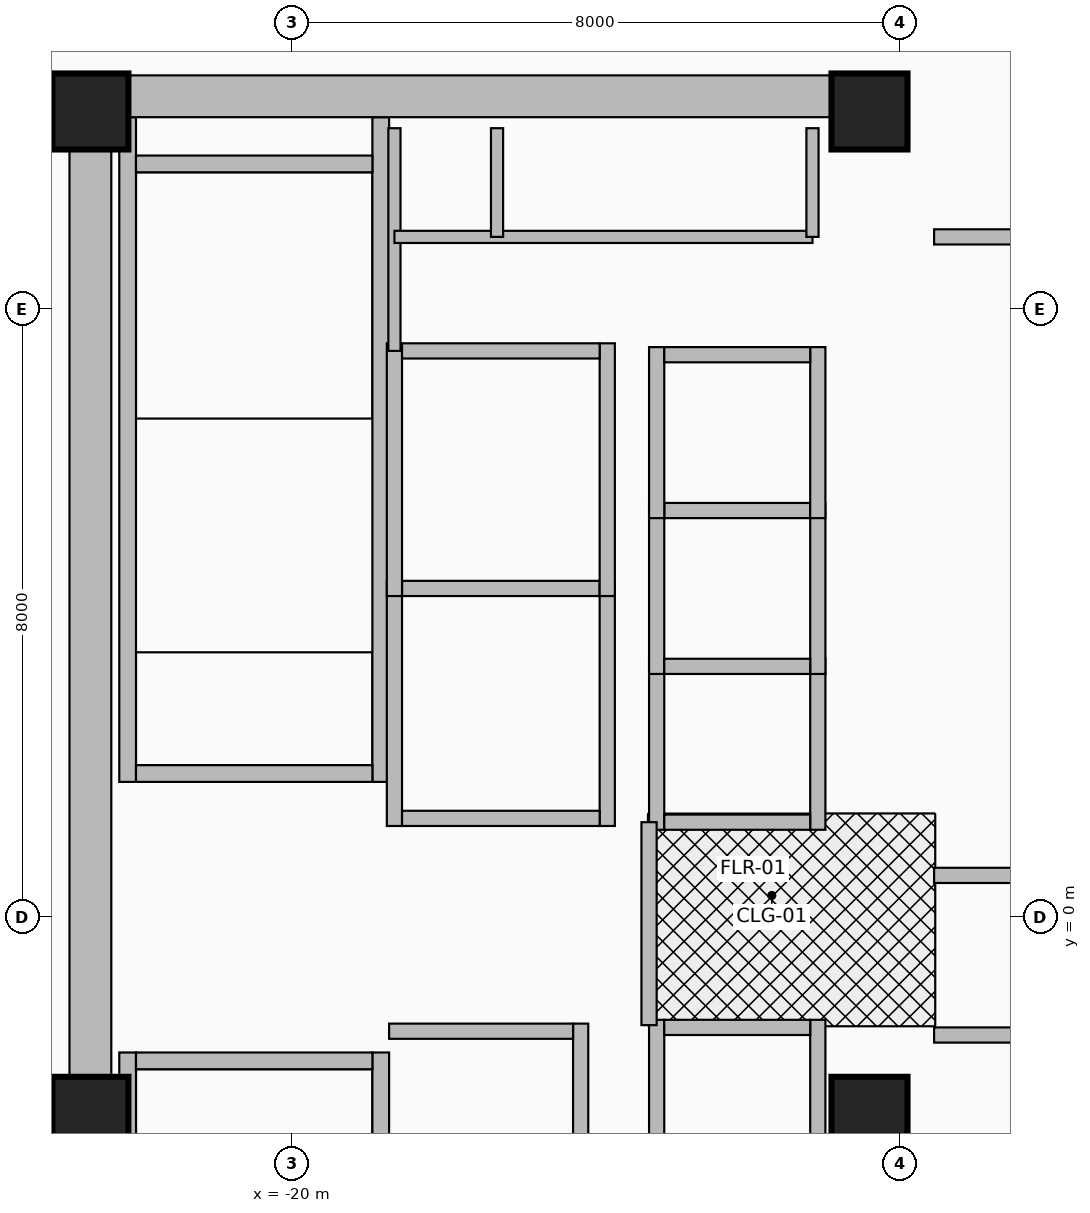
"""IFC4 building model, lengths in metres.
Left out: names, types, materials, properties, quantities, classifications, styles, units other than length and angle.
Written with IfcOpenShell. Run it as: python <this file> out.ifc"""

import sys

from ifc_helpers import new_model, si_unit, direction, frame, frame_2d, origin, origin_2d, place, context, subcontext, project, spatial, rectangle, extrude, source, transform, mapped, element, fill, save


model = new_model("IFC4")
c1 = context("Model", 3, precision=1e-05, world=origin(), true_north=direction((0.0, 1.0)))
c2 = subcontext(c1, "Body", "Model", "MODEL_VIEW")
j1 = project(units=[si_unit("LENGTHUNIT", "METRE"), si_unit("PLANEANGLEUNIT", "RADIAN")], contexts=[c1])
p1 = place(None, origin())
s1 = spatial("IfcSite", under=j1, at=p1, CompositionType="ELEMENT")
p2 = place(p1, origin())
s2 = spatial("IfcBuilding", under=s1, at=p2, CompositionType="ELEMENT")
p3 = place(p2, frame((0.0, 0.0, 172.3)))
s3 = spatial("IfcBuildingStorey", under=s2, at=p3, CompositionType="ELEMENT", Elevation=172.3)
for number, where, z_axis, x_axis in (
    (1, (-22.16, 1.78, 0.0), (0.0, 0.0, 1.0), (0.0, 1.0, 0.0)),
    (2, (-18.83, 1.78, 0.0), (0.0, 0.0, 1.0), (0.0, 1.0, 0.0)),
):
    element("IfcWall", number, at=place(p3, frame(where, z_axis=z_axis, x_axis=x_axis)), inside=s3, PredefinedType="SHEAR", context=c2, shape_type="SweptSolid", body=[
        extrude(rectangle(XDim=8.745, YDim=0.22, at=frame_2d((4.373, 0.0))), origin(), (0.0, 0.0, 1.0), 3.93),
    ])
p4 = place(p3, frame((-22.05, 1.89, 0.0), z_axis=(0.0, 0.0, 1.0), x_axis=(1.0, 0.0, 0.0)))
e3 = element("IfcWall", 3, at=p4, inside=s3, PredefinedType="SHEAR", context=c2, shape_type="SweptSolid", body=[
    extrude(rectangle(XDim=3.11, YDim=0.22, at=frame_2d((1.555, 0.0))), origin(), (0.0, 0.0, 1.0), 3.93),
])
p5 = place(p4, frame((1.0, 0.0, 0.0)))
e4 = element("IfcOpeningElement", 4, at=p5, cuts=e3, PredefinedType="OPENING", context=c2, shape_type="SweptSolid", body=[
    extrude(rectangle(XDim=1.1, YDim=2.15, at=frame_2d((0.55, 1.075))), frame((0.0, 0.125, 0.0), z_axis=(0.0, -1.0, 0.0), x_axis=(1.0, 0.0, 0.0)), (0.0, 0.0, 1.0), 0.25),
])
p6 = place(p3, frame((-22.05, 9.91, 0.0), z_axis=(0.0, 0.0, 1.0), x_axis=(1.0, 0.0, 0.0)))
e5 = element("IfcWall", 5, at=p6, inside=s3, PredefinedType="SHEAR", context=c2, shape_type="SweptSolid", body=[
    extrude(rectangle(XDim=3.11, YDim=0.22, at=frame_2d((1.555, 0.0))), origin(), (0.0, 0.0, 1.0), 3.93),
])
for number, where, z_axis, x_axis in (
    (6, (-22.16, -10.525, 0.0), (0.0, 0.0, 1.0), (0.0, 1.0, 0.0)),
    (7, (-18.83, -10.525, 0.0), (0.0, 0.0, 1.0), (0.0, 1.0, 0.0)),
):
    element("IfcWall", number, at=place(p3, frame(where, z_axis=z_axis, x_axis=x_axis)), inside=s3, PredefinedType="SHEAR", context=c2, shape_type="SweptSolid", body=[
        extrude(rectangle(XDim=8.745, YDim=0.22, at=frame_2d((4.373, 0.0))), origin(), (0.0, 0.0, 1.0), 3.93),
    ])
p7 = place(p3, frame((-22.05, -1.89, 0.0), z_axis=(0.0, 0.0, 1.0), x_axis=(1.0, 0.0, 0.0)))
e8 = element("IfcWall", 8, at=p7, inside=s3, PredefinedType="SHEAR", context=c2, shape_type="SweptSolid", body=[
    extrude(rectangle(XDim=3.11, YDim=0.22, at=frame_2d((1.555, 0.0))), origin(), (0.0, 0.0, 1.0), 3.93),
])
p8 = place(p7, frame((1.0, 0.0, 0.0)))
e9 = element("IfcOpeningElement", 9, at=p8, cuts=e8, PredefinedType="OPENING", context=c2, shape_type="SweptSolid", body=[
    extrude(rectangle(XDim=1.1, YDim=2.15, at=frame_2d((0.55, 1.075))), frame((0.0, 0.125, 0.0), z_axis=(0.0, -1.0, 0.0), x_axis=(1.0, 0.0, 0.0)), (0.0, 0.0, 1.0), 0.25),
])
p9 = place(p3, frame((-22.65, -11.075, 0.0), z_axis=(0.0, 0.0, 1.0), x_axis=(0.0, 1.0, 0.0)))
e10 = element("IfcWall", 10, at=p9, inside=s3, PredefinedType="SHEAR", context=c2, shape_type="SweptSolid", body=[
    extrude(rectangle(XDim=22.15, YDim=0.55, at=frame_2d((11.075, 0.0))), origin(), (0.0, 0.0, 1.0), 3.93),
])
p10 = place(p3, frame((-22.65, 10.8, 0.0), z_axis=(0.0, 0.0, 1.0), x_axis=(1.0, 0.0, 0.0)))
e11 = element("IfcWall", 11, at=p10, inside=s3, PredefinedType="SHEAR", context=c2, shape_type="SweptSolid", body=[
    extrude(rectangle(XDim=10.25, YDim=0.55, at=frame_2d((5.125, 0.0))), origin(), (0.0, 0.0, 1.0), 3.93),
])
m1 = source(origin(), c2, "Body", "SweptSolid", [
    extrude(rectangle(XDim=1.0, YDim=1.0, at=origin_2d()), origin(), (0.0, 0.0, 1.0), 4.25),
])
for number, where, z_axis, x_axis in (
    (12, (-22.65, -2.6, 0.0), (0.0, 0.0, 1.0), (1.0, 0.0, 0.0)),
    (13, (-12.4, -2.6, 0.0), (0.0, 0.0, 1.0), (1.0, 0.0, 0.0)),
    (14, (-22.65, 10.6, 0.0), (0.0, 0.0, 1.0), (1.0, 0.0, 0.0)),
    (15, (-12.4, 10.6, 0.0), (0.0, 0.0, 1.0), (1.0, 0.0, 0.0)),
):
    element("IfcColumn", number, at=place(p3, frame(where, z_axis=z_axis, x_axis=x_axis)), inside=s3, PredefinedType="COLUMN", context=c2, shape_type="MappedRepresentation", body=[
        mapped(m1, transform((0.0, 0.0, 0.0), x_axis=(1.0, 0.0, 0.0), y_axis=(0.0, 1.0, 0.0), z_axis=(0.0, 0.0, 1.0), scale=1.0)),
    ])
for number, where, z_axis, x_axis in (
    (16, (-18.65, 1.2, 0.0), (0.0, 0.0, 1.0), (0.0, 1.0, 0.0)),
    (17, (-15.85, 1.2, 0.0), (0.0, 0.0, 1.0), (0.0, 1.0, 0.0)),
):
    element("IfcWall", number, at=place(p3, frame(where, z_axis=z_axis, x_axis=x_axis)), inside=s3, PredefinedType="MOVABLE", context=c2, shape_type="SweptSolid", body=[
        extrude(rectangle(XDim=3.225, YDim=0.2, at=frame_2d((1.613, 0.0))), origin(), (0.0, 0.0, 1.0), 3.93),
    ])
p11 = place(p3, frame((-18.55, 1.3, 0.0), z_axis=(0.0, 0.0, 1.0), x_axis=(1.0, 0.0, 0.0)))
e18 = element("IfcWall", 18, at=p11, inside=s3, PredefinedType="MOVABLE", context=c2, shape_type="SweptSolid", body=[
    extrude(rectangle(XDim=2.6, YDim=0.2, at=frame_2d((1.3, 0.0))), origin(), (0.0, 0.0, 1.0), 3.93),
])
p12 = place(p11, frame((0.7, 0.0, 0.0)))
e19 = element("IfcOpeningElement", 19, at=p12, cuts=e18, PredefinedType="OPENING", context=c2, shape_type="SweptSolid", body=[
    extrude(rectangle(XDim=1.2, YDim=2.1, at=frame_2d((0.6, 1.05))), frame((0.0, 0.115, 0.0), z_axis=(0.0, -1.0, 0.0), x_axis=(1.0, 0.0, 0.0)), (0.0, 0.0, 1.0), 0.23),
])
p13 = place(p3, frame((-18.55, 4.325, 0.0), z_axis=(0.0, 0.0, 1.0), x_axis=(1.0, 0.0, 0.0)))
e20 = element("IfcWall", 20, at=p13, inside=s3, PredefinedType="MOVABLE", context=c2, shape_type="SweptSolid", body=[
    extrude(rectangle(XDim=2.6, YDim=0.2, at=frame_2d((1.3, 0.0))), origin(), (0.0, 0.0, 1.0), 3.93),
])
p14 = place(p3, frame((-16.2, -4.6, 0.0), z_axis=(0.0, 0.0, 1.0), x_axis=(0.0, 1.0, 0.0)))
e21 = element("IfcWall", 21, at=p14, inside=s3, PredefinedType="MOVABLE", context=c2, shape_type="SweptSolid", body=[
    extrude(rectangle(XDim=3.2, YDim=0.2, at=frame_2d((1.6, 0.0))), origin(), (0.0, 0.0, 1.0), 3.93),
])
p15 = place(p3, frame((-18.72, -1.5, 0.0), z_axis=(0.0, 0.0, 1.0), x_axis=(1.0, 0.0, 0.0)))
e22 = element("IfcWall", 22, at=p15, inside=s3, PredefinedType="MOVABLE", context=c2, shape_type="SweptSolid", body=[
    extrude(rectangle(XDim=2.42, YDim=0.2, at=frame_2d((1.21, 0.0))), origin(), (0.0, 0.0, 1.0), 3.93),
])
p16 = place(p15, frame((0.61, 0.0, 0.0)))
e23 = element("IfcOpeningElement", 23, at=p16, cuts=e22, PredefinedType="OPENING", context=c2, shape_type="SweptSolid", body=[
    extrude(rectangle(XDim=1.2, YDim=2.1, at=frame_2d((0.6, 1.05))), frame((0.0, 0.115, 0.0), z_axis=(0.0, -1.0, 0.0), x_axis=(1.0, 0.0, 0.0)), (0.0, 0.0, 1.0), 0.23),
])
for number, where, z_axis, x_axis in (
    (24, (-18.65, 4.225, 0.0), (0.0, 0.0, 1.0), (0.0, 1.0, 0.0)),
    (25, (-15.85, 4.225, 0.0), (0.0, 0.0, 1.0), (0.0, 1.0, 0.0)),
):
    element("IfcWall", number, at=place(p3, frame(where, z_axis=z_axis, x_axis=x_axis)), inside=s3, PredefinedType="MOVABLE", context=c2, shape_type="SweptSolid", body=[
        extrude(rectangle(XDim=3.325, YDim=0.2, at=frame_2d((1.663, 0.0))), origin(), (0.0, 0.0, 1.0), 3.93),
    ])
p17 = place(p3, frame((-18.55, 7.45, 0.0), z_axis=(0.0, 0.0, 1.0), x_axis=(1.0, 0.0, 0.0)))
e26 = element("IfcWall", 26, at=p17, inside=s3, PredefinedType="MOVABLE", context=c2, shape_type="SweptSolid", body=[
    extrude(rectangle(XDim=2.6, YDim=0.2, at=frame_2d((1.3, 0.0))), origin(), (0.0, 0.0, 1.0), 3.93),
])
p18 = place(p17, frame((0.7, 0.0, 0.0)))
e27 = element("IfcOpeningElement", 27, at=p18, cuts=e26, PredefinedType="OPENING", context=c2, shape_type="SweptSolid", body=[
    extrude(rectangle(XDim=1.2, YDim=2.1, at=frame_2d((0.6, 1.05))), frame((0.0, 0.115, 0.0), z_axis=(0.0, -1.0, 0.0), x_axis=(1.0, 0.0, 0.0)), (0.0, 0.0, 1.0), 0.23),
])
p19 = place(p3, frame((-15.2, 1.15, 0.0), z_axis=(0.0, 0.0, 1.0), x_axis=(0.0, 1.0, 0.0)))
e28 = element("IfcWall", 28, at=p19, inside=s3, PredefinedType="MOVABLE", context=c2, shape_type="SweptSolid", body=[
    extrude(rectangle(XDim=2.25, YDim=0.2, at=frame_2d((1.125, 0.0))), origin(), (0.0, 0.0, 1.0), 3.93),
])
p20 = place(p3, frame((-13.08, 1.15, 0.0), z_axis=(0.0, 0.0, 1.0), x_axis=(0.0, 1.0, 0.0)))
e29 = element("IfcWall", 29, at=p20, inside=s3, PredefinedType="MOVABLE", context=c2, shape_type="SweptSolid", body=[
    extrude(rectangle(XDim=2.25, YDim=0.2, at=frame_2d((1.125, 0.0))), origin(), (0.0, 0.0, 1.0), 3.93),
])
p21 = place(p20, frame((0.575, 0.0, 0.0)))
e30 = element("IfcOpeningElement", 30, at=p21, cuts=e29, PredefinedType="OPENING", context=c2, shape_type="SweptSolid", body=[
    extrude(rectangle(XDim=1.1, YDim=2.1, at=frame_2d((0.55, 1.05))), frame((0.0, 0.115, 0.0), z_axis=(0.0, -1.0, 0.0), x_axis=(1.0, 0.0, 0.0)), (0.0, 0.0, 1.0), 0.23),
])
p22 = place(p3, frame((-15.1, 1.25, 0.0), z_axis=(0.0, 0.0, 1.0), x_axis=(1.0, 0.0, 0.0)))
e31 = element("IfcWall", 31, at=p22, inside=s3, PredefinedType="MOVABLE", context=c2, shape_type="SweptSolid", body=[
    extrude(rectangle(XDim=1.92, YDim=0.2, at=frame_2d((0.96, 0.0))), origin(), (0.0, 0.0, 1.0), 3.93),
])
for number, where, z_axis, x_axis in (
    (32, (-15.2, 3.2, 0.0), (0.0, 0.0, 1.0), (0.0, 1.0, 0.0)),
    (33, (-13.08, 3.2, 0.0), (0.0, 0.0, 1.0), (0.0, 1.0, 0.0)),
):
    element("IfcWall", number, at=place(p3, frame(where, z_axis=z_axis, x_axis=x_axis)), inside=s3, PredefinedType="MOVABLE", context=c2, shape_type="SweptSolid", body=[
        extrude(rectangle(XDim=2.25, YDim=0.2, at=frame_2d((1.125, 0.0))), origin(), (0.0, 0.0, 1.0), 3.93),
    ])
for number, where, z_axis, x_axis in (
    (34, (-15.1, 3.3, 0.0), (0.0, 0.0, 1.0), (1.0, 0.0, 0.0)),
    (35, (-15.1, 5.35, 0.0), (0.0, 0.0, 1.0), (1.0, 0.0, 0.0)),
):
    element("IfcWall", number, at=place(p3, frame(where, z_axis=z_axis, x_axis=x_axis)), inside=s3, PredefinedType="MOVABLE", context=c2, shape_type="SweptSolid", body=[
        extrude(rectangle(XDim=1.92, YDim=0.2, at=frame_2d((0.96, 0.0))), origin(), (0.0, 0.0, 1.0), 3.93),
    ])
for number, where, z_axis, x_axis in (
    (36, (-15.2, 5.25, 0.0), (0.0, 0.0, 1.0), (0.0, 1.0, 0.0)),
    (37, (-13.08, 5.25, 0.0), (0.0, 0.0, 1.0), (0.0, 1.0, 0.0)),
):
    element("IfcWall", number, at=place(p3, frame(where, z_axis=z_axis, x_axis=x_axis)), inside=s3, PredefinedType="MOVABLE", context=c2, shape_type="SweptSolid", body=[
        extrude(rectangle(XDim=2.25, YDim=0.2, at=frame_2d((1.125, 0.0))), origin(), (0.0, 0.0, 1.0), 3.93),
    ])
p23 = place(p3, frame((-15.1, 7.4, 0.0), z_axis=(0.0, 0.0, 1.0), x_axis=(1.0, 0.0, 0.0)))
e38 = element("IfcWall", 38, at=p23, inside=s3, PredefinedType="MOVABLE", context=c2, shape_type="SweptSolid", body=[
    extrude(rectangle(XDim=1.92, YDim=0.2, at=frame_2d((0.96, 0.0))), origin(), (0.0, 0.0, 1.0), 3.93),
])
for number, where, z_axis, x_axis in (
    (39, (-15.2, -3.7, 0.0), (0.0, 0.0, 1.0), (0.0, 1.0, 0.0)),
    (40, (-13.08, -3.7, 0.0), (0.0, 0.0, 1.0), (0.0, 1.0, 0.0)),
):
    element("IfcWall", number, at=place(p3, frame(where, z_axis=z_axis, x_axis=x_axis)), inside=s3, PredefinedType="MOVABLE", context=c2, shape_type="SweptSolid", body=[
        extrude(rectangle(XDim=2.35, YDim=0.2, at=frame_2d((1.175, 0.0))), origin(), (0.0, 0.0, 1.0), 3.93),
    ])
p24 = place(p3, frame((-15.1, -1.45, 0.0), z_axis=(0.0, 0.0, 1.0), x_axis=(1.0, 0.0, 0.0)))
e41 = element("IfcWall", 41, at=p24, inside=s3, PredefinedType="MOVABLE", context=c2, shape_type="SweptSolid", body=[
    extrude(rectangle(XDim=1.92, YDim=0.2, at=frame_2d((0.96, 0.0))), origin(), (0.0, 0.0, 1.0), 3.93),
])
p25 = place(p3, frame((-15.3, -1.42, 0.0), z_axis=(0.0, 0.0, 1.0), x_axis=(0.0, 1.0, 0.0)))
e42 = element("IfcWall", 42, at=p25, inside=s3, PredefinedType="PARTITIONING", context=c2, shape_type="SweptSolid", body=[
    extrude(rectangle(XDim=2.67, YDim=0.2, at=frame_2d((1.335, 0.0))), origin(), (0.0, 0.0, 1.0), 3.93),
])
p26 = place(p25, frame((0.78, 0.0, 0.0)))
e43 = element("IfcOpeningElement", 43, at=p26, cuts=e42, PredefinedType="OPENING", context=c2, shape_type="SweptSolid", body=[
    extrude(rectangle(XDim=1.05, YDim=2.15, at=frame_2d((0.525, 1.075))), frame((0.0, 0.115, 0.0), z_axis=(0.0, -1.0, 0.0), x_axis=(1.0, 0.0, 0.0)), (0.0, 0.0, 1.0), 0.23),
])
p27 = place(p3, frame((-18.65, 7.45, 0.0), z_axis=(0.0, 0.0, 1.0), x_axis=(0.0, 1.0, 0.0)))
e44 = element("IfcWall", 44, at=p27, inside=s3, PredefinedType="PARTITIONING", context=c2, shape_type="SweptSolid", body=[
    extrude(rectangle(XDim=2.93, YDim=0.16, at=frame_2d((1.465, 0.0))), origin(), (0.0, 0.0, 1.0), 3.93),
])
p28 = place(p3, frame((-18.65, 8.95, 0.0), z_axis=(0.0, 0.0, 1.0), x_axis=(1.0, 0.0, 0.0)))
e45 = element("IfcWall", 45, at=p28, inside=s3, PredefinedType="PARTITIONING", context=c2, shape_type="SweptSolid", body=[
    extrude(rectangle(XDim=5.5, YDim=0.16, at=frame_2d((2.75, 0.0))), origin(), (0.0, 0.0, 1.0), 3.93),
])
p29 = place(p28, frame((0.3, 0.0, 0.0)))
e46 = element("IfcOpeningElement", 46, at=p29, cuts=e45, PredefinedType="OPENING", context=c2, shape_type="SweptSolid", body=[
    extrude(rectangle(XDim=0.85, YDim=2.05, at=frame_2d((0.425, 1.025))), frame((0.0, 0.095, 0.0), z_axis=(0.0, -1.0, 0.0), x_axis=(1.0, 0.0, 0.0)), (0.0, 0.0, 1.0), 0.19),
])
p30 = place(p28, frame((2.5, 0.0, 0.0)))
e47 = element("IfcOpeningElement", 47, at=p30, cuts=e45, PredefinedType="OPENING", context=c2, shape_type="SweptSolid", body=[
    extrude(rectangle(XDim=0.95, YDim=2.15, at=frame_2d((0.475, 1.075))), frame((0.0, 0.095, 0.0), z_axis=(0.0, -1.0, 0.0), x_axis=(1.0, 0.0, 0.0)), (0.0, 0.0, 1.0), 0.19),
])
for number, where, z_axis, x_axis in (
    (48, (-13.15, 8.95, 0.0), (0.0, 0.0, 1.0), (0.0, 1.0, 0.0)),
    (49, (-17.3, 8.95, 0.0), (0.0, 0.0, 1.0), (0.0, 1.0, 0.0)),
):
    element("IfcWall", number, at=place(p3, frame(where, z_axis=z_axis, x_axis=x_axis)), inside=s3, PredefinedType="PARTITIONING", context=c2, shape_type="SweptSolid", body=[
        extrude(rectangle(XDim=1.43, YDim=0.16, at=frame_2d((0.715, 0.0))), origin(), (0.0, 0.0, 1.0), 3.93),
    ])
p31 = place(p3, frame((-11.55, 0.55, 0.0), z_axis=(0.0, 0.0, 1.0), x_axis=(1.0, 0.0, 0.0)))
e50 = element("IfcWall", 50, at=p31, inside=s3, PredefinedType="PARTITIONING", context=c2, shape_type="SweptSolid", body=[
    extrude(rectangle(XDim=24.97, YDim=0.2, at=frame_2d((12.485, 0.0))), origin(), (0.0, 0.0, 1.0), 2.715),
])
p32 = place(p3, frame((-11.55, -1.55, 0.0), z_axis=(0.0, 0.0, 1.0), x_axis=(1.0, 0.0, 0.0)))
e51 = element("IfcWall", 51, at=p32, inside=s3, PredefinedType="PARTITIONING", context=c2, shape_type="SweptSolid", body=[
    extrude(rectangle(XDim=1.5, YDim=0.2, at=frame_2d((0.75, 0.0))), origin(), (0.0, 0.0, 1.0), 2.715),
])
p33 = place(p3, frame((-11.55, 8.95, 0.0), z_axis=(0.0, 0.0, 1.0), x_axis=(1.0, 0.0, 0.0)))
e52 = element("IfcWall", 52, at=p33, inside=s3, PredefinedType="PARTITIONING", context=c2, shape_type="SweptSolid", body=[
    extrude(rectangle(XDim=17.35, YDim=0.2, at=frame_2d((8.675, 0.0))), origin(), (0.0, 0.0, 1.0), 2.715),
])
p34 = place(p12, origin())
e53 = element("IfcDoor", 53, at=p34, inside=s3, OperationType="DOUBLE_DOOR_SLIDING", PredefinedType="DOOR", context=c2, shape_type="SweptSolid", body=[
    extrude(rectangle(XDim=1.2, YDim=2.1, at=frame_2d((0.6, 1.05))), frame((0.0, 0.025, 0.0), z_axis=(0.0, -1.0, 0.0), x_axis=(1.0, 0.0, 0.0)), (0.0, 0.0, 1.0), 0.05),
])
fill(e19, e53)
p35 = place(p16, origin())
e54 = element("IfcDoor", 54, at=p35, inside=s3, OperationType="DOUBLE_DOOR_SLIDING", PredefinedType="DOOR", context=c2, shape_type="SweptSolid", body=[
    extrude(rectangle(XDim=1.2, YDim=2.1, at=frame_2d((0.6, 1.05))), frame((0.0, 0.025, 0.0), z_axis=(0.0, -1.0, 0.0), x_axis=(1.0, 0.0, 0.0)), (0.0, 0.0, 1.0), 0.05),
])
fill(e23, e54)
p36 = place(p18, origin())
e55 = element("IfcDoor", 55, at=p36, inside=s3, OperationType="DOUBLE_DOOR_SLIDING", PredefinedType="DOOR", context=c2, shape_type="SweptSolid", body=[
    extrude(rectangle(XDim=1.2, YDim=2.1, at=frame_2d((0.6, 1.05))), frame((0.0, 0.025, 0.0), z_axis=(0.0, -1.0, 0.0), x_axis=(1.0, 0.0, 0.0)), (0.0, 0.0, 1.0), 0.05),
])
fill(e27, e55)
p37 = place(p21, origin())
e56 = element("IfcDoor", 56, at=p37, inside=s3, OperationType="DOUBLE_DOOR_SLIDING", PredefinedType="DOOR", context=c2, shape_type="SweptSolid", body=[
    extrude(rectangle(XDim=1.1, YDim=2.1, at=frame_2d((0.55, 1.05))), frame((0.0, 0.025, 0.0), z_axis=(0.0, -1.0, 0.0), x_axis=(1.0, 0.0, 0.0)), (0.0, 0.0, 1.0), 0.05),
])
fill(e30, e56)
p38 = place(p26, origin())
e57 = element("IfcDoor", 57, at=p38, inside=s3, OperationType="SINGLE_SWING_RIGHT", PredefinedType="DOOR", context=c2, shape_type="SweptSolid", body=[
    extrude(rectangle(XDim=1.05, YDim=2.15, at=frame_2d((0.525, 1.075))), frame((0.0, 0.025, 0.0), z_axis=(0.0, -1.0, 0.0), x_axis=(1.0, 0.0, 0.0)), (0.0, 0.0, 1.0), 0.05),
])
fill(e43, e57)
p39 = place(p5, frame((1.1, 0.0, 0.0), z_axis=(0.0, 0.0, 1.0), x_axis=(-1.0, 0.0, 0.0)))
e58 = element("IfcDoor", 58, at=p39, inside=s3, OperationType="SINGLE_SWING_LEFT", PredefinedType="DOOR", context=c2, shape_type="SweptSolid", body=[
    extrude(rectangle(XDim=1.1, YDim=2.15, at=frame_2d((0.55, 1.075))), frame((0.0, 0.025, 0.0), z_axis=(0.0, -1.0, 0.0), x_axis=(1.0, 0.0, 0.0)), (0.0, 0.0, 1.0), 0.05),
])
fill(e4, e58)
p40 = place(p8, origin())
e59 = element("IfcDoor", 59, at=p40, inside=s3, OperationType="SINGLE_SWING_RIGHT", PredefinedType="DOOR", context=c2, shape_type="SweptSolid", body=[
    extrude(rectangle(XDim=1.1, YDim=2.15, at=frame_2d((0.55, 1.075))), frame((0.0, 0.025, 0.0), z_axis=(0.0, -1.0, 0.0), x_axis=(1.0, 0.0, 0.0)), (0.0, 0.0, 1.0), 0.05),
])
fill(e9, e59)
p41 = place(p29, origin())
e60 = element("IfcDoor", 60, at=p41, inside=s3, OperationType="SINGLE_SWING_LEFT", PredefinedType="DOOR", context=c2, shape_type="SweptSolid", body=[
    extrude(rectangle(XDim=0.85, YDim=2.05, at=frame_2d((0.425, 1.025))), frame((0.0, 0.025, 0.0), z_axis=(0.0, -1.0, 0.0), x_axis=(1.0, 0.0, 0.0)), (0.0, 0.0, 1.0), 0.05),
])
fill(e46, e60)
p42 = place(p30, origin())
e61 = element("IfcDoor", 61, at=p42, inside=s3, OperationType="SINGLE_SWING_RIGHT", PredefinedType="DOOR", context=c2, shape_type="SweptSolid", body=[
    extrude(rectangle(XDim=0.95, YDim=2.15, at=frame_2d((0.475, 1.075))), frame((0.0, 0.025, 0.0), z_axis=(0.0, -1.0, 0.0), x_axis=(1.0, 0.0, 0.0)), (0.0, 0.0, 1.0), 0.05),
])
fill(e47, e61)
save(model, sys.argv[1])
